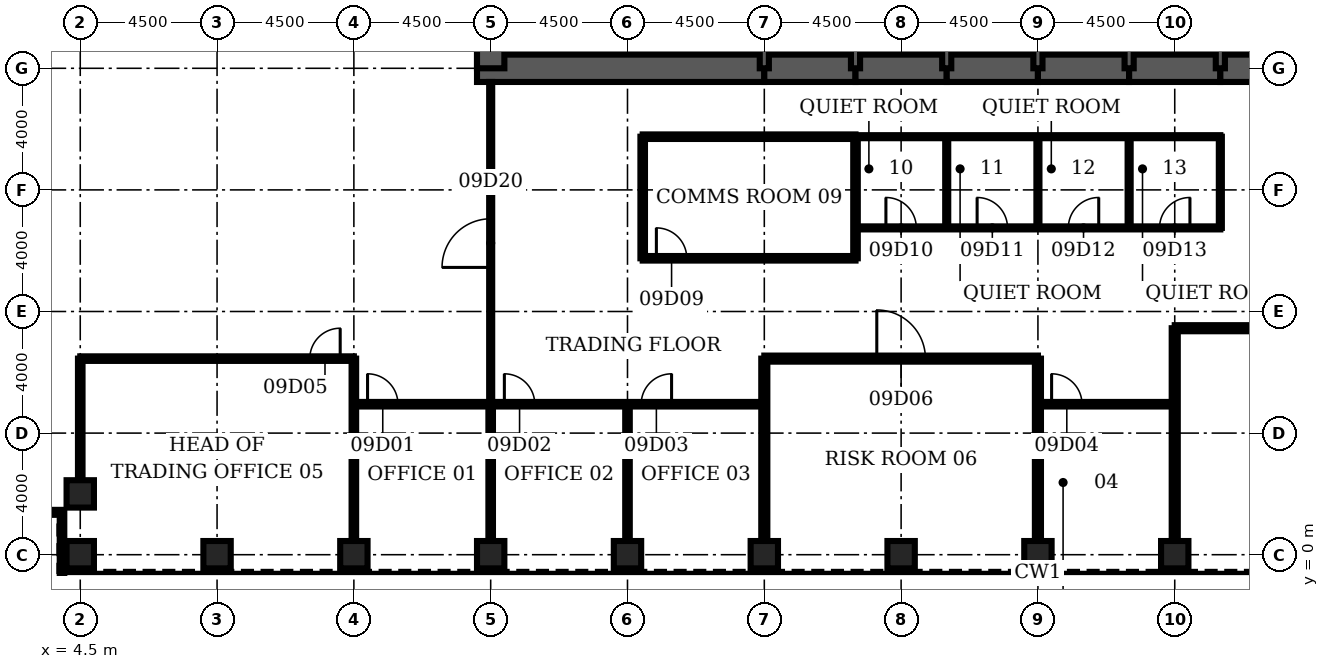
"""IFC4 building model, lengths in metres.
Left out: names, types, materials, properties, quantities, classifications, styles, units other than length and angle.
Written with IfcOpenShell. Run it as: python <this file> out.ifc"""

import sys

from ifc_helpers import new_model, si_unit, direction, frame, frame_2d, origin, origin_2d, place, context, subcontext, project, spatial, rectangle, hollow_rectangle, extrude, element, fill, save


model = new_model("IFC4")
c1 = context("Model", 3, precision=1e-05, world=origin(), true_north=direction((0.0, 1.0)))
c2 = subcontext(c1, "Body", "Model", "MODEL_VIEW")
j1 = project(units=[si_unit("LENGTHUNIT", "METRE"), si_unit("PLANEANGLEUNIT", "RADIAN")], contexts=[c1])
p1 = place(None, origin())
s1 = spatial("IfcSite", under=j1, at=p1, CompositionType="ELEMENT")
p2 = place(p1, origin())
s2 = spatial("IfcBuilding", under=s1, at=p2, CompositionType="ELEMENT")
p3 = place(p2, frame((0.0, 0.0, 45.5)))
s3 = spatial("IfcBuildingStorey", under=s2, at=p3, CompositionType="ELEMENT", Elevation=45.5)
for number, where, z_axis, x_axis in (
    (1, (4.5, 0.0, 0.0), (0.0, 0.0, 1.0), (0.0, 1.0, 0.0)),
    (2, (9.0, 0.0, 0.0), (0.0, 0.0, 1.0), (0.0, 1.0, 0.0)),
    (3, (13.5, 0.0, 0.0), (0.0, 0.0, 1.0), (0.0, 1.0, 0.0)),
    (4, (18.0, 0.0, 0.0), (0.0, 0.0, 1.0), (0.0, 1.0, 0.0)),
    (5, (22.5, 0.0, 0.0), (0.0, 0.0, 1.0), (0.0, 1.0, 0.0)),
    (6, (27.0, 0.0, 0.0), (0.0, 0.0, 1.0), (0.0, 1.0, 0.0)),
    (7, (31.5, 0.0, 0.0), (0.0, 0.0, 1.0), (0.0, 1.0, 0.0)),
    (8, (36.0, 0.0, 0.0), (0.0, 0.0, 1.0), (0.0, 1.0, 0.0)),
    (9, (40.5, 0.0, 0.0), (0.0, 0.0, 1.0), (0.0, 1.0, 0.0)),
    (10, (4.5, 2.0, 0.0), (0.0, 0.0, 1.0), (0.0, 1.0, 0.0)),
):
    element("IfcColumn", number, at=place(p3, frame(where, z_axis=z_axis, x_axis=x_axis)), inside=s3, PredefinedType="COLUMN", context=c2, shape_type="SweptSolid", body=[
        extrude(hollow_rectangle(XDim=0.9, YDim=0.9, WallThickness=0.12, at=origin_2d()), origin(), (0.0, 0.0, 1.0), 4.5),
    ])
p4 = place(p3, frame((17.55, 16.0, 0.0), z_axis=(0.0, 0.0, 1.0), x_axis=(1.0, 0.0, 0.0)))
e11 = element("IfcWall", 11, at=p4, inside=s3, PredefinedType="SHEAR", context=c2, shape_type="SweptSolid", body=[
    extrude(rectangle(XDim=9.45, YDim=0.9, at=frame_2d((4.725, 0.0))), origin(), (0.0, 0.0, 1.0), 4.5),
])
for number, where, z_axis, x_axis in (
    (12, (27.0, 16.0, 0.0), (0.0, 0.0, 1.0), (1.0, 0.0, 0.0)),
    (13, (30.0, 16.0, 0.0), (0.0, 0.0, 1.0), (1.0, 0.0, 0.0)),
    (14, (33.0, 16.0, 0.0), (0.0, 0.0, 1.0), (1.0, 0.0, 0.0)),
    (15, (36.0, 16.0, 0.0), (0.0, 0.0, 1.0), (1.0, 0.0, 0.0)),
    (16, (39.0, 16.0, 0.0), (0.0, 0.0, 1.0), (1.0, 0.0, 0.0)),
    (17, (42.0, 16.0, 0.0), (0.0, 0.0, 1.0), (1.0, 0.0, 0.0)),
):
    element("IfcWall", number, at=place(p3, frame(where, z_axis=z_axis, x_axis=x_axis)), inside=s3, PredefinedType="SHEAR", context=c2, shape_type="SweptSolid", body=[
        extrude(rectangle(XDim=3.0, YDim=0.9, at=frame_2d((1.5, 0.0))), origin(), (0.0, 0.0, 1.0), 4.5),
    ])
p5 = place(p3, frame((18.0, 19.2, 0.0), z_axis=(0.0, 0.0, 1.0), x_axis=(0.0, -1.0, 0.0)))
e18 = element("IfcWall", 18, at=p5, inside=s3, PredefinedType="SHEAR", context=c2, shape_type="SweptSolid", body=[
    extrude(rectangle(XDim=3.2, YDim=0.9, at=frame_2d((1.6, 0.0))), origin(), (0.0, 0.0, 1.0), 4.5),
])
for number, where, z_axis, x_axis in (
    (19, (27.0, 16.0, 0.0), (0.0, 0.0, 1.0), (0.0, 1.0, 0.0)),
    (20, (30.0, 16.0, 0.0), (0.0, 0.0, 1.0), (0.0, 1.0, 0.0)),
    (21, (33.0, 16.0, 0.0), (0.0, 0.0, 1.0), (0.0, 1.0, 0.0)),
    (22, (36.0, 16.0, 0.0), (0.0, 0.0, 1.0), (0.0, 1.0, 0.0)),
    (23, (39.0, 16.0, 0.0), (0.0, 0.0, 1.0), (0.0, 1.0, 0.0)),
    (24, (42.0, 16.0, 0.0), (0.0, 0.0, 1.0), (0.0, 1.0, 0.0)),
):
    element("IfcWall", number, at=place(p3, frame(where, z_axis=z_axis, x_axis=x_axis)), inside=s3, PredefinedType="SOLIDWALL", context=c2, shape_type="SweptSolid", body=[
        extrude(rectangle(XDim=3.2, YDim=0.3, at=frame_2d((1.6, 0.0))), origin(), (0.0, 0.0, 1.0), 4.5),
    ])
p6 = place(p3, frame((13.5, 4.95, 0.0), z_axis=(0.0, 0.0, 1.0), x_axis=(1.0, 0.0, 0.0)))
e25 = element("IfcWall", 25, at=p6, inside=s3, PredefinedType="PARTITIONING", context=c2, shape_type="SweptSolid", body=[
    extrude(rectangle(XDim=13.5, YDim=0.15, at=frame_2d((6.75, 0.0))), origin(), (0.0, 0.0, 1.0), 3.0),
])
p7 = place(p6, frame((0.45, 0.0, 0.0)))
e26 = element("IfcOpeningElement", 26, at=p7, cuts=e25, PredefinedType="OPENING", context=c2, shape_type="SweptSolid", body=[
    extrude(rectangle(XDim=1.0, YDim=2.1, at=frame_2d((0.5, 1.05))), frame((0.0, 0.085, 0.0), z_axis=(0.0, -1.0, 0.0), x_axis=(1.0, 0.0, 0.0)), (0.0, 0.0, 1.0), 0.17),
])
p8 = place(p6, frame((4.95, 0.0, 0.0)))
e27 = element("IfcOpeningElement", 27, at=p8, cuts=e25, PredefinedType="OPENING", context=c2, shape_type="SweptSolid", body=[
    extrude(rectangle(XDim=1.0, YDim=2.1, at=frame_2d((0.5, 1.05))), frame((0.0, 0.085, 0.0), z_axis=(0.0, -1.0, 0.0), x_axis=(1.0, 0.0, 0.0)), (0.0, 0.0, 1.0), 0.17),
])
p9 = place(p6, frame((9.45, 0.0, 0.0)))
e28 = element("IfcOpeningElement", 28, at=p9, cuts=e25, PredefinedType="OPENING", context=c2, shape_type="SweptSolid", body=[
    extrude(rectangle(XDim=1.0, YDim=2.1, at=frame_2d((0.5, 1.05))), frame((0.0, 0.085, 0.0), z_axis=(0.0, -1.0, 0.0), x_axis=(1.0, 0.0, 0.0)), (0.0, 0.0, 1.0), 0.17),
])
p10 = place(p3, frame((36.0, 4.95, 0.0), z_axis=(0.0, 0.0, 1.0), x_axis=(1.0, 0.0, 0.0)))
e29 = element("IfcWall", 29, at=p10, inside=s3, PredefinedType="PARTITIONING", context=c2, shape_type="SweptSolid", body=[
    extrude(rectangle(XDim=4.5, YDim=0.15, at=frame_2d((2.25, 0.0))), origin(), (0.0, 0.0, 1.0), 3.0),
])
p11 = place(p10, frame((0.45, 0.0, 0.0)))
e30 = element("IfcOpeningElement", 30, at=p11, cuts=e29, PredefinedType="OPENING", context=c2, shape_type="SweptSolid", body=[
    extrude(rectangle(XDim=1.0, YDim=2.1, at=frame_2d((0.5, 1.05))), frame((0.0, 0.085, 0.0), z_axis=(0.0, -1.0, 0.0), x_axis=(1.0, 0.0, 0.0)), (0.0, 0.0, 1.0), 0.17),
])
p12 = place(p3, frame((4.5, 6.45, 0.0), z_axis=(0.0, 0.0, 1.0), x_axis=(1.0, 0.0, 0.0)))
e31 = element("IfcWall", 31, at=p12, inside=s3, PredefinedType="PARTITIONING", context=c2, shape_type="SweptSolid", body=[
    extrude(rectangle(XDim=9.0, YDim=0.15, at=frame_2d((4.5, 0.0))), origin(), (0.0, 0.0, 1.0), 3.0),
])
p13 = place(p12, frame((7.55, 0.0, 0.0)))
e32 = element("IfcOpeningElement", 32, at=p13, cuts=e31, PredefinedType="OPENING", context=c2, shape_type="SweptSolid", body=[
    extrude(rectangle(XDim=1.0, YDim=2.1, at=frame_2d((0.5, 1.05))), frame((0.0, 0.085, 0.0), z_axis=(0.0, -1.0, 0.0), x_axis=(1.0, 0.0, 0.0)), (0.0, 0.0, 1.0), 0.17),
])
p14 = place(p3, frame((27.0, 6.45, 0.0), z_axis=(0.0, 0.0, 1.0), x_axis=(1.0, 0.0, 0.0)))
e33 = element("IfcWall", 33, at=p14, inside=s3, PredefinedType="PARTITIONING", context=c2, shape_type="SweptSolid", body=[
    extrude(rectangle(XDim=9.0, YDim=0.2, at=frame_2d((4.5, 0.0))), origin(), (0.0, 0.0, 1.0), 3.0),
])
p15 = place(p14, frame((3.7, 0.0, 0.0)))
e34 = element("IfcOpeningElement", 34, at=p15, cuts=e33, PredefinedType="OPENING", context=c2, shape_type="SweptSolid", body=[
    extrude(rectangle(XDim=1.6, YDim=2.1, at=frame_2d((0.8, 1.05))), frame((0.0, 0.11, 0.0), z_axis=(0.0, -1.0, 0.0), x_axis=(1.0, 0.0, 0.0)), (0.0, 0.0, 1.0), 0.22),
])
p16 = place(p3, frame((40.5, 7.45, 0.0), z_axis=(0.0, 0.0, 1.0), x_axis=(1.0, 0.0, 0.0)))
e35 = element("IfcWall", 35, at=p16, inside=s3, PredefinedType="PARTITIONING", context=c2, shape_type="SweptSolid", body=[
    extrude(rectangle(XDim=18.0, YDim=0.2, at=frame_2d((9.0, 0.0))), origin(), (0.0, 0.0, 1.0), 3.0),
])
p17 = place(p16, frame((8.2, 0.0, 0.0)))
e36 = element("IfcOpeningElement", 36, at=p17, cuts=e35, PredefinedType="OPENING", context=c2, shape_type="SweptSolid", body=[
    extrude(rectangle(XDim=1.6, YDim=2.1, at=frame_2d((0.8, 1.05))), frame((0.0, 0.11, 0.0), z_axis=(0.0, -1.0, 0.0), x_axis=(1.0, 0.0, 0.0)), (0.0, 0.0, 1.0), 0.22),
])
p18 = place(p3, frame((23.0, 9.75, 0.0), z_axis=(0.0, 0.0, 1.0), x_axis=(1.0, 0.0, 0.0)))
e37 = element("IfcWall", 37, at=p18, inside=s3, PredefinedType="PARTITIONING", context=c2, shape_type="SweptSolid", body=[
    extrude(rectangle(XDim=7.0, YDim=0.15, at=frame_2d((3.5, 0.0))), origin(), (0.0, 0.0, 1.0), 3.0),
])
p19 = place(p18, frame((0.45, 0.0, 0.0)))
e38 = element("IfcOpeningElement", 38, at=p19, cuts=e37, PredefinedType="OPENING", context=c2, shape_type="SweptSolid", body=[
    extrude(rectangle(XDim=1.0, YDim=2.1, at=frame_2d((0.5, 1.05))), frame((0.0, 0.085, 0.0), z_axis=(0.0, -1.0, 0.0), x_axis=(1.0, 0.0, 0.0)), (0.0, 0.0, 1.0), 0.17),
])
p20 = place(p3, frame((30.0, 10.75, 0.0), z_axis=(0.0, 0.0, 1.0), x_axis=(1.0, 0.0, 0.0)))
e39 = element("IfcWall", 39, at=p20, inside=s3, PredefinedType="PARTITIONING", context=c2, shape_type="SweptSolid", body=[
    extrude(rectangle(XDim=12.0, YDim=0.1, at=frame_2d((6.0, 0.0))), origin(), (0.0, 0.0, 1.0), 3.0),
])
p21 = place(p20, frame((1.0, 0.0, 0.0)))
e40 = element("IfcOpeningElement", 40, at=p21, cuts=e39, PredefinedType="OPENING", context=c2, shape_type="SweptSolid", body=[
    extrude(rectangle(XDim=1.0, YDim=2.1, at=frame_2d((0.5, 1.05))), frame((0.0, 0.06, 0.0), z_axis=(0.0, -1.0, 0.0), x_axis=(1.0, 0.0, 0.0)), (0.0, 0.0, 1.0), 0.12),
])
p22 = place(p20, frame((4.0, 0.0, 0.0)))
e41 = element("IfcOpeningElement", 41, at=p22, cuts=e39, PredefinedType="OPENING", context=c2, shape_type="SweptSolid", body=[
    extrude(rectangle(XDim=1.0, YDim=2.1, at=frame_2d((0.5, 1.05))), frame((0.0, 0.06, 0.0), z_axis=(0.0, -1.0, 0.0), x_axis=(1.0, 0.0, 0.0)), (0.0, 0.0, 1.0), 0.12),
])
p23 = place(p20, frame((7.0, 0.0, 0.0)))
e42 = element("IfcOpeningElement", 42, at=p23, cuts=e39, PredefinedType="OPENING", context=c2, shape_type="SweptSolid", body=[
    extrude(rectangle(XDim=1.0, YDim=2.1, at=frame_2d((0.5, 1.05))), frame((0.0, 0.06, 0.0), z_axis=(0.0, -1.0, 0.0), x_axis=(1.0, 0.0, 0.0)), (0.0, 0.0, 1.0), 0.12),
])
p24 = place(p20, frame((10.0, 0.0, 0.0)))
e43 = element("IfcOpeningElement", 43, at=p24, cuts=e39, PredefinedType="OPENING", context=c2, shape_type="SweptSolid", body=[
    extrude(rectangle(XDim=1.0, YDim=2.1, at=frame_2d((0.5, 1.05))), frame((0.0, 0.06, 0.0), z_axis=(0.0, -1.0, 0.0), x_axis=(1.0, 0.0, 0.0)), (0.0, 0.0, 1.0), 0.12),
])
p25 = place(p3, frame((23.0, 13.75, 0.0), z_axis=(0.0, 0.0, 1.0), x_axis=(1.0, 0.0, 0.0)))
e44 = element("IfcWall", 44, at=p25, inside=s3, PredefinedType="PARTITIONING", context=c2, shape_type="SweptSolid", body=[
    extrude(rectangle(XDim=7.0, YDim=0.15, at=frame_2d((3.5, 0.0))), origin(), (0.0, 0.0, 1.0), 3.0),
])
p26 = place(p3, frame((30.0, 13.75, 0.0), z_axis=(0.0, 0.0, 1.0), x_axis=(1.0, 0.0, 0.0)))
e45 = element("IfcWall", 45, at=p26, inside=s3, PredefinedType="PARTITIONING", context=c2, shape_type="SweptSolid", body=[
    extrude(rectangle(XDim=12.0, YDim=0.1, at=frame_2d((6.0, 0.0))), origin(), (0.0, 0.0, 1.0), 3.0),
])
p27 = place(p3, frame((4.5, 2.45, 0.0), z_axis=(0.0, 0.0, 1.0), x_axis=(0.0, 1.0, 0.0)))
e46 = element("IfcWall", 46, at=p27, inside=s3, PredefinedType="PARTITIONING", context=c2, shape_type="SweptSolid", body=[
    extrude(rectangle(XDim=4.0, YDim=0.15, at=frame_2d((2.0, 0.0))), origin(), (0.0, 0.0, 1.0), 3.0),
])
p28 = place(p3, frame((13.5, 0.45, 0.0), z_axis=(0.0, 0.0, 1.0), x_axis=(0.0, 1.0, 0.0)))
e47 = element("IfcWall", 47, at=p28, inside=s3, PredefinedType="PARTITIONING", context=c2, shape_type="SweptSolid", body=[
    extrude(rectangle(XDim=6.0, YDim=0.15, at=frame_2d((3.0, 0.0))), origin(), (0.0, 0.0, 1.0), 3.0),
])
p29 = place(p3, frame((18.0, 0.45, 0.0), z_axis=(0.0, 0.0, 1.0), x_axis=(0.0, 1.0, 0.0)))
e48 = element("IfcWall", 48, at=p29, inside=s3, PredefinedType="PARTITIONING", context=c2, shape_type="SweptSolid", body=[
    extrude(rectangle(XDim=4.5, YDim=0.15, at=frame_2d((2.25, 0.0))), origin(), (0.0, 0.0, 1.0), 3.0),
])
p30 = place(p3, frame((18.0, 4.95, 0.0), z_axis=(0.0, 0.0, 1.0), x_axis=(0.0, 1.0, 0.0)))
e49 = element("IfcWall", 49, at=p30, inside=s3, PredefinedType="PARTITIONING", context=c2, shape_type="SweptSolid", body=[
    extrude(rectangle(XDim=10.6, YDim=0.1, at=frame_2d((5.3, 0.0))), origin(), (0.0, 0.0, 1.0), 3.0),
])
p31 = place(p30, frame((4.5, 0.0, 0.0)))
e50 = element("IfcOpeningElement", 50, at=p31, cuts=e49, PredefinedType="OPENING", context=c2, shape_type="SweptSolid", body=[
    extrude(rectangle(XDim=1.6, YDim=2.1, at=frame_2d((0.8, 1.05))), frame((0.0, 0.06, 0.0), z_axis=(0.0, -1.0, 0.0), x_axis=(1.0, 0.0, 0.0)), (0.0, 0.0, 1.0), 0.12),
])
p32 = place(p3, frame((22.5, 0.45, 0.0), z_axis=(0.0, 0.0, 1.0), x_axis=(0.0, 1.0, 0.0)))
e51 = element("IfcWall", 51, at=p32, inside=s3, PredefinedType="PARTITIONING", context=c2, shape_type="SweptSolid", body=[
    extrude(rectangle(XDim=4.5, YDim=0.15, at=frame_2d((2.25, 0.0))), origin(), (0.0, 0.0, 1.0), 3.0),
])
p33 = place(p3, frame((23.0, 9.75, 0.0), z_axis=(0.0, 0.0, 1.0), x_axis=(0.0, 1.0, 0.0)))
e52 = element("IfcWall", 52, at=p33, inside=s3, PredefinedType="PARTITIONING", context=c2, shape_type="SweptSolid", body=[
    extrude(rectangle(XDim=4.0, YDim=0.15, at=frame_2d((2.0, 0.0))), origin(), (0.0, 0.0, 1.0), 3.0),
])
p34 = place(p3, frame((27.0, 0.45, 0.0), z_axis=(0.0, 0.0, 1.0), x_axis=(0.0, 1.0, 0.0)))
e53 = element("IfcWall", 53, at=p34, inside=s3, PredefinedType="PARTITIONING", context=c2, shape_type="SweptSolid", body=[
    extrude(rectangle(XDim=6.0, YDim=0.2, at=frame_2d((3.0, 0.0))), origin(), (0.0, 0.0, 1.0), 3.0),
])
p35 = place(p3, frame((30.0, 9.75, 0.0), z_axis=(0.0, 0.0, 1.0), x_axis=(0.0, 1.0, 0.0)))
e54 = element("IfcWall", 54, at=p35, inside=s3, PredefinedType="PARTITIONING", context=c2, shape_type="SweptSolid", body=[
    extrude(rectangle(XDim=4.0, YDim=0.15, at=frame_2d((2.0, 0.0))), origin(), (0.0, 0.0, 1.0), 3.0),
])
p36 = place(p3, frame((33.0, 10.75, 0.0), z_axis=(0.0, 0.0, 1.0), x_axis=(0.0, 1.0, 0.0)))
e55 = element("IfcWall", 55, at=p36, inside=s3, PredefinedType="PARTITIONING", context=c2, shape_type="SweptSolid", body=[
    extrude(rectangle(XDim=3.0, YDim=0.1, at=frame_2d((1.5, 0.0))), origin(), (0.0, 0.0, 1.0), 3.0),
])
p37 = place(p3, frame((36.0, 0.45, 0.0), z_axis=(0.0, 0.0, 1.0), x_axis=(0.0, 1.0, 0.0)))
e56 = element("IfcWall", 56, at=p37, inside=s3, PredefinedType="PARTITIONING", context=c2, shape_type="SweptSolid", body=[
    extrude(rectangle(XDim=6.0, YDim=0.2, at=frame_2d((3.0, 0.0))), origin(), (0.0, 0.0, 1.0), 3.0),
])
for number, where, z_axis, x_axis in (
    (57, (36.0, 10.75, 0.0), (0.0, 0.0, 1.0), (0.0, 1.0, 0.0)),
    (58, (39.0, 10.75, 0.0), (0.0, 0.0, 1.0), (0.0, 1.0, 0.0)),
):
    element("IfcWall", number, at=place(p3, frame(where, z_axis=z_axis, x_axis=x_axis)), inside=s3, PredefinedType="PARTITIONING", context=c2, shape_type="SweptSolid", body=[
        extrude(rectangle(XDim=3.0, YDim=0.1, at=frame_2d((1.5, 0.0))), origin(), (0.0, 0.0, 1.0), 3.0),
    ])
p38 = place(p3, frame((40.5, 0.45, 0.0), z_axis=(0.0, 0.0, 1.0), x_axis=(0.0, 1.0, 0.0)))
e59 = element("IfcWall", 59, at=p38, inside=s3, PredefinedType="PARTITIONING", context=c2, shape_type="SweptSolid", body=[
    extrude(rectangle(XDim=7.0, YDim=0.2, at=frame_2d((3.5, 0.0))), origin(), (0.0, 0.0, 1.0), 3.0),
])
p39 = place(p3, frame((42.0, 10.75, 0.0), z_axis=(0.0, 0.0, 1.0), x_axis=(0.0, 1.0, 0.0)))
e60 = element("IfcWall", 60, at=p39, inside=s3, PredefinedType="PARTITIONING", context=c2, shape_type="SweptSolid", body=[
    extrude(rectangle(XDim=3.0, YDim=0.1, at=frame_2d((1.5, 0.0))), origin(), (0.0, 0.0, 1.0), 3.0),
])
p40 = place(p3, frame((1.65, 1.4, 0.0), z_axis=(0.0, 0.0, 1.0), x_axis=(1.0, 0.0, 0.0)))
e61 = element("IfcWall", 61, at=p40, inside=s3, PredefinedType="ELEMENTEDWALL", context=c2, shape_type="SweptSolid", body=[
    extrude(rectangle(XDim=2.25, YDim=0.15, at=frame_2d((1.125, 0.0))), origin(), (0.0, 0.0, 1.0), 4.32),
])
p41 = place(p3, frame((3.9, 1.4, 0.0), z_axis=(0.0, 0.0, 1.0), x_axis=(0.0, -1.0, 0.0)))
e62 = element("IfcWall", 62, at=p41, inside=s3, PredefinedType="ELEMENTEDWALL", context=c2, shape_type="SweptSolid", body=[
    extrude(rectangle(XDim=2.0, YDim=0.15, at=frame_2d((1.0, 0.0))), origin(), (0.0, 0.0, 1.0), 4.32),
])
p42 = place(p7, origin())
e63 = element("IfcDoor", 63, at=p42, inside=s3, OperationType="SINGLE_SWING_LEFT", PredefinedType="DOOR", context=c2, shape_type="SweptSolid", body=[
    extrude(rectangle(XDim=1.0, YDim=2.1, at=frame_2d((0.5, 1.05))), frame((0.0, 0.025, 0.0), z_axis=(0.0, -1.0, 0.0), x_axis=(1.0, 0.0, 0.0)), (0.0, 0.0, 1.0), 0.05),
])
fill(e26, e63)
p43 = place(p8, origin())
e64 = element("IfcDoor", 64, at=p43, inside=s3, OperationType="SINGLE_SWING_LEFT", PredefinedType="DOOR", context=c2, shape_type="SweptSolid", body=[
    extrude(rectangle(XDim=1.0, YDim=2.1, at=frame_2d((0.5, 1.05))), frame((0.0, 0.025, 0.0), z_axis=(0.0, -1.0, 0.0), x_axis=(1.0, 0.0, 0.0)), (0.0, 0.0, 1.0), 0.05),
])
fill(e27, e64)
p44 = place(p9, origin())
e65 = element("IfcDoor", 65, at=p44, inside=s3, OperationType="SINGLE_SWING_RIGHT", PredefinedType="DOOR", context=c2, shape_type="SweptSolid", body=[
    extrude(rectangle(XDim=1.0, YDim=2.1, at=frame_2d((0.5, 1.05))), frame((0.0, 0.025, 0.0), z_axis=(0.0, -1.0, 0.0), x_axis=(1.0, 0.0, 0.0)), (0.0, 0.0, 1.0), 0.05),
])
fill(e28, e65)
p45 = place(p11, origin())
e66 = element("IfcDoor", 66, at=p45, inside=s3, OperationType="SINGLE_SWING_LEFT", PredefinedType="DOOR", context=c2, shape_type="SweptSolid", body=[
    extrude(rectangle(XDim=1.0, YDim=2.1, at=frame_2d((0.5, 1.05))), frame((0.0, 0.025, 0.0), z_axis=(0.0, -1.0, 0.0), x_axis=(1.0, 0.0, 0.0)), (0.0, 0.0, 1.0), 0.05),
])
fill(e30, e66)
p46 = place(p13, origin())
e67 = element("IfcDoor", 67, at=p46, inside=s3, OperationType="SINGLE_SWING_RIGHT", PredefinedType="DOOR", context=c2, shape_type="SweptSolid", body=[
    extrude(rectangle(XDim=1.0, YDim=2.1, at=frame_2d((0.5, 1.05))), frame((0.0, 0.025, 0.0), z_axis=(0.0, -1.0, 0.0), x_axis=(1.0, 0.0, 0.0)), (0.0, 0.0, 1.0), 0.05),
])
fill(e32, e67)
p47 = place(p15, origin())
e68 = element("IfcDoor", 68, at=p47, inside=s3, OperationType="SINGLE_SWING_LEFT", PredefinedType="DOOR", context=c2, shape_type="SweptSolid", body=[
    extrude(rectangle(XDim=1.6, YDim=2.1, at=frame_2d((0.8, 1.05))), frame((0.0, 0.025, 0.0), z_axis=(0.0, -1.0, 0.0), x_axis=(1.0, 0.0, 0.0)), (0.0, 0.0, 1.0), 0.05),
])
fill(e34, e68)
p48 = place(p19, origin())
e69 = element("IfcDoor", 69, at=p48, inside=s3, OperationType="SINGLE_SWING_LEFT", PredefinedType="DOOR", context=c2, shape_type="SweptSolid", body=[
    extrude(rectangle(XDim=1.0, YDim=2.1, at=frame_2d((0.5, 1.05))), frame((0.0, 0.025, 0.0), z_axis=(0.0, -1.0, 0.0), x_axis=(1.0, 0.0, 0.0)), (0.0, 0.0, 1.0), 0.05),
])
fill(e38, e69)
p49 = place(p21, origin())
e70 = element("IfcDoor", 70, at=p49, inside=s3, OperationType="SINGLE_SWING_LEFT", PredefinedType="DOOR", context=c2, shape_type="SweptSolid", body=[
    extrude(rectangle(XDim=1.0, YDim=2.1, at=frame_2d((0.5, 1.05))), frame((0.0, 0.025, 0.0), z_axis=(0.0, -1.0, 0.0), x_axis=(1.0, 0.0, 0.0)), (0.0, 0.0, 1.0), 0.05),
])
fill(e40, e70)
p50 = place(p22, origin())
e71 = element("IfcDoor", 71, at=p50, inside=s3, OperationType="SINGLE_SWING_LEFT", PredefinedType="DOOR", context=c2, shape_type="SweptSolid", body=[
    extrude(rectangle(XDim=1.0, YDim=2.1, at=frame_2d((0.5, 1.05))), frame((0.0, 0.025, 0.0), z_axis=(0.0, -1.0, 0.0), x_axis=(1.0, 0.0, 0.0)), (0.0, 0.0, 1.0), 0.05),
])
fill(e41, e71)
p51 = place(p23, origin())
e72 = element("IfcDoor", 72, at=p51, inside=s3, OperationType="SINGLE_SWING_RIGHT", PredefinedType="DOOR", context=c2, shape_type="SweptSolid", body=[
    extrude(rectangle(XDim=1.0, YDim=2.1, at=frame_2d((0.5, 1.05))), frame((0.0, 0.025, 0.0), z_axis=(0.0, -1.0, 0.0), x_axis=(1.0, 0.0, 0.0)), (0.0, 0.0, 1.0), 0.05),
])
fill(e42, e72)
p52 = place(p24, origin())
e73 = element("IfcDoor", 73, at=p52, inside=s3, OperationType="SINGLE_SWING_RIGHT", PredefinedType="DOOR", context=c2, shape_type="SweptSolid", body=[
    extrude(rectangle(XDim=1.0, YDim=2.1, at=frame_2d((0.5, 1.05))), frame((0.0, 0.025, 0.0), z_axis=(0.0, -1.0, 0.0), x_axis=(1.0, 0.0, 0.0)), (0.0, 0.0, 1.0), 0.05),
])
fill(e43, e73)
p53 = place(p31, origin())
e74 = element("IfcDoor", 74, at=p53, inside=s3, OperationType="SINGLE_SWING_LEFT", PredefinedType="DOOR", context=c2, shape_type="SweptSolid", body=[
    extrude(rectangle(XDim=1.6, YDim=2.1, at=frame_2d((0.8, 1.05))), frame((0.0, 0.025, 0.0), z_axis=(0.0, -1.0, 0.0), x_axis=(1.0, 0.0, 0.0)), (0.0, 0.0, 1.0), 0.05),
])
fill(e50, e74)
save(model, sys.argv[1])
